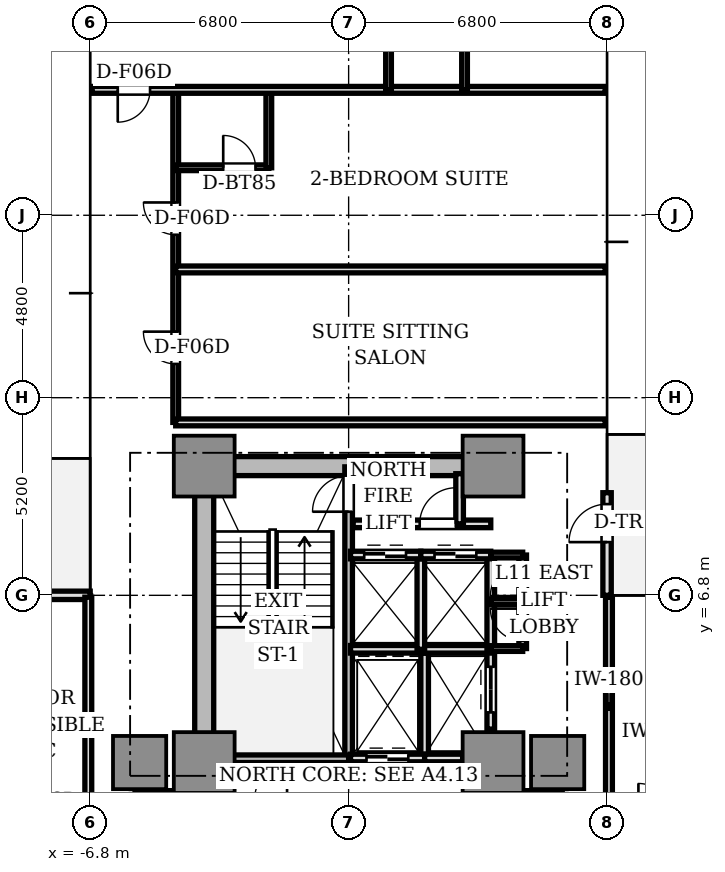
"""IFC4 building model, lengths in metres.
Left out: names, types, materials, properties, quantities, classifications, styles, units other than length and angle.
Written with IfcOpenShell. Run it as: python <this file> out.ifc"""

import sys

from ifc_helpers import new_model, si_unit, direction, frame, frame_2d, origin, origin_2d, place, context, subcontext, project, spatial, rectangle, extrude, source, transform, mapped, element, fill, save


model = new_model("IFC4")
c1 = context("Model", 3, precision=1e-05, world=origin(), true_north=direction((0.0, 1.0)))
c2 = subcontext(c1, "Body", "Model", "MODEL_VIEW")
j1 = project(units=[si_unit("LENGTHUNIT", "METRE"), si_unit("PLANEANGLEUNIT", "RADIAN")], contexts=[c1])
p1 = place(None, origin())
s1 = spatial("IfcSite", under=j1, at=p1, CompositionType="ELEMENT")
p2 = place(p1, origin())
s2 = spatial("IfcBuilding", under=s1, at=p2, CompositionType="ELEMENT")
p3 = place(p2, frame((0.0, 0.0, 43.2)))
s3 = spatial("IfcBuildingStorey", under=s2, at=p3, CompositionType="ELEMENT", Elevation=43.2)
p4 = place(p3, frame((-3.55, 10.2, 0.0), z_axis=(0.0, 0.0, 1.0), x_axis=(1.0, 0.0, 0.0)))
e1 = element("IfcWall", 1, at=p4, inside=s3, PredefinedType="SHEAR", context=c2, shape_type="SweptSolid", body=[
    extrude(rectangle(XDim=7.1, YDim=0.5, at=frame_2d((3.55, 0.0))), origin(), (0.0, 0.0, 1.0), 3.05),
])
p5 = place(p3, frame((-3.8, 2.85, 0.0), z_axis=(0.0, 0.0, 1.0), x_axis=(0.0, 1.0, 0.0)))
e2 = element("IfcWall", 2, at=p5, inside=s3, PredefinedType="SHEAR", context=c2, shape_type="SweptSolid", body=[
    extrude(rectangle(XDim=6.9, YDim=0.5, at=frame_2d((3.45, 0.0))), origin(), (0.0, 0.0, 1.0), 3.05),
])
m1 = source(origin(), c2, "Body", "SweptSolid", [
    extrude(rectangle(XDim=1.6, YDim=1.6, at=origin_2d()), origin(), (0.0, 0.0, 1.0), 3.05),
])
for number, where, z_axis, x_axis in (
    (3, (-3.8, 2.4, 0.0), (0.0, 0.0, 1.0), (1.0, 0.0, 0.0)),
    (4, (3.8, 2.4, 0.0), (0.0, 0.0, 1.0), (1.0, 0.0, 0.0)),
    (5, (-3.8, 10.2, 0.0), (0.0, 0.0, 1.0), (1.0, 0.0, 0.0)),
    (6, (3.8, 10.2, 0.0), (0.0, 0.0, 1.0), (1.0, 0.0, 0.0)),
):
    element("IfcColumn", number, at=place(p3, frame(where, z_axis=z_axis, x_axis=x_axis)), inside=s3, PredefinedType="COLUMN", context=c2, shape_type="MappedRepresentation", body=[
        mapped(m1, transform((0.0, 0.0, 0.0), scale=1.0)),
    ])
m2 = source(origin(), c2, "Body", "SweptSolid", [
    extrude(rectangle(XDim=1.4, YDim=1.4, at=origin_2d()), origin(), (0.0, 0.0, 1.0), 3.05),
])
for number, where, z_axis, x_axis in (
    (7, (5.5, 2.4, 0.0), (0.0, 0.0, 1.0), (1.0, 0.0, 0.0)),
    (8, (-5.5, 2.4, 0.0), (0.0, 0.0, 1.0), (1.0, 0.0, 0.0)),
):
    element("IfcColumn", number, at=place(p3, frame(where, z_axis=z_axis, x_axis=x_axis)), inside=s3, PredefinedType="COLUMN", context=c2, shape_type="MappedRepresentation", body=[
        mapped(m2, transform((0.0, 0.0, 0.0), scale=1.0)),
    ])
p6 = place(p3, frame((6.8, 6.8, 0.0), z_axis=(0.0, 0.0, 1.0), x_axis=(0.0, 1.0, 0.0)))
e9 = element("IfcWall", 9, at=p6, inside=s3, PredefinedType="STANDARD", context=c2, shape_type="SweptSolid", body=[
    extrude(rectangle(XDim=2.7, YDim=0.22, at=frame_2d((1.35, 0.0))), origin(), (0.0, 0.0, 1.0), 3.05),
])
p7 = place(p6, frame((1.4, 0.0, 0.0)))
e10 = element("IfcOpeningElement", 10, at=p7, cuts=e9, PredefinedType="OPENING", context=c2, shape_type="SweptSolid", body=[
    extrude(rectangle(XDim=1.0, YDim=2.2, at=frame_2d((0.5, 1.1))), frame((0.0, 0.12, 0.0), z_axis=(0.0, -1.0, 0.0), x_axis=(1.0, 0.0, 0.0)), (0.0, 0.0, 1.0), 0.24),
])
p8 = place(p3, frame((-6.8, 6.8, 0.0), z_axis=(0.0, 0.0, 1.0), x_axis=(-1.0, 0.0, 0.0)))
e11 = element("IfcWall", 11, at=p8, inside=s3, PredefinedType="STANDARD", context=c2, shape_type="SweptSolid", body=[
    extrude(rectangle(XDim=2.7, YDim=0.22, at=frame_2d((1.35, 0.0))), origin(), (0.0, 0.0, 1.0), 3.05),
])
p9 = place(p8, frame((1.4, 0.0, 0.0)))
e12 = element("IfcOpeningElement", 12, at=p9, cuts=e11, PredefinedType="OPENING", context=c2, shape_type="SweptSolid", body=[
    extrude(rectangle(XDim=1.0, YDim=2.2, at=frame_2d((0.5, 1.1))), frame((0.0, 0.12, 0.0), z_axis=(0.0, -1.0, 0.0), x_axis=(1.0, 0.0, 0.0)), (0.0, 0.0, 1.0), 0.24),
])
p10 = place(p3, frame((0.0, 2.5, 0.0), z_axis=(0.0, 0.0, 1.0), x_axis=(0.0, 1.0, 0.0)))
e13 = element("IfcWall", 13, at=p10, inside=s3, PredefinedType="SOLIDWALL", context=c2, shape_type="SweptSolid", body=[
    extrude(rectangle(XDim=7.68, YDim=0.2, at=frame_2d((3.84, 0.0))), origin(), (0.0, 0.0, 1.0), 3.05),
])
p11 = place(p10, frame((6.5, 0.0, 0.0)))
e14 = element("IfcOpeningElement", 14, at=p11, cuts=e13, PredefinedType="OPENING", context=c2, shape_type="SweptSolid", body=[
    extrude(rectangle(XDim=0.95, YDim=2.15, at=frame_2d((0.475, 1.075))), frame((0.0, 0.11, 0.0), z_axis=(0.0, -1.0, 0.0), x_axis=(1.0, 0.0, 0.0)), (0.0, 0.0, 1.0), 0.22),
])
p12 = place(p3, frame((-3.72, 2.5, 0.0), z_axis=(0.0, 0.0, 1.0), x_axis=(1.0, 0.0, 0.0)))
e15 = element("IfcWall", 15, at=p12, inside=s3, PredefinedType="SOLIDWALL", context=c2, shape_type="SweptSolid", body=[
    extrude(rectangle(XDim=3.72, YDim=0.2, at=frame_2d((1.86, 0.0))), origin(), (0.0, 0.0, 1.0), 3.05),
])
p13 = place(p3, frame((2.0, 2.5, 0.0), z_axis=(0.0, 0.0, 1.0), x_axis=(0.0, 1.0, 0.0)))
e16 = element("IfcWall", 16, at=p13, inside=s3, PredefinedType="SOLIDWALL", context=c2, shape_type="SweptSolid", body=[
    extrude(rectangle(XDim=2.78, YDim=0.2, at=frame_2d((1.39, 0.0))), origin(), (0.0, 0.0, 1.0), 2.6),
])
p14 = place(p3, frame((0.05, 2.52, 0.0), z_axis=(0.0, 0.0, 1.0), x_axis=(1.0, 0.0, 0.0)))
e17 = element("IfcWall", 17, at=p14, inside=s3, PredefinedType="SOLIDWALL", context=c2, shape_type="SweptSolid", body=[
    extrude(rectangle(XDim=1.95, YDim=0.2, at=frame_2d((0.975, 0.0))), origin(), (0.0, 0.0, 1.0), 2.6),
])
p15 = place(p14, frame((0.42, 0.0, 0.0)))
e18 = element("IfcOpeningElement", 18, at=p15, cuts=e17, PredefinedType="OPENING", context=c2, shape_type="SweptSolid", body=[
    extrude(rectangle(XDim=1.1, YDim=2.2, at=frame_2d((0.55, 1.1))), frame((0.0, 0.11, 0.0), z_axis=(0.0, -1.0, 0.0), x_axis=(1.0, 0.0, 0.0)), (0.0, 0.0, 1.0), 0.22),
])
p16 = place(p3, frame((2.0, 2.52, 0.0), z_axis=(0.0, 0.0, 1.0), x_axis=(1.0, 0.0, 0.0)))
e19 = element("IfcWall", 19, at=p16, inside=s3, PredefinedType="SOLIDWALL", context=c2, shape_type="SweptSolid", body=[
    extrude(rectangle(XDim=1.0, YDim=0.2, at=frame_2d((0.5, 0.0))), origin(), (0.0, 0.0, 1.0), 2.6),
])
p17 = place(p3, frame((3.74, 3.28, 0.0), z_axis=(0.0, 0.0, 1.0), x_axis=(0.0, 1.0, 0.0)))
e20 = element("IfcWall", 20, at=p17, inside=s3, PredefinedType="SOLIDWALL", context=c2, shape_type="SweptSolid", body=[
    extrude(rectangle(XDim=2.08, YDim=0.2, at=frame_2d((1.04, 0.0))), origin(), (0.0, 0.0, 1.0), 2.6),
])
p18 = place(p17, frame((0.44, 0.0, 0.0)))
e21 = element("IfcOpeningElement", 21, at=p18, cuts=e20, PredefinedType="OPENING", context=c2, shape_type="SweptSolid", body=[
    extrude(rectangle(XDim=1.2, YDim=2.2, at=frame_2d((0.6, 1.1))), frame((0.0, 0.11, 0.0), z_axis=(0.0, -1.0, 0.0), x_axis=(1.0, 0.0, 0.0)), (0.0, 0.0, 1.0), 0.22),
])
p19 = place(p3, frame((0.05, 5.38, 0.0), z_axis=(0.0, 0.0, 1.0), x_axis=(1.0, 0.0, 0.0)))
e22 = element("IfcWall", 22, at=p19, inside=s3, PredefinedType="SOLIDWALL", context=c2, shape_type="SweptSolid", body=[
    extrude(rectangle(XDim=3.69, YDim=0.2, at=frame_2d((1.845, 0.0))), origin(), (0.0, 0.0, 1.0), 2.6),
])
p20 = place(p3, frame((1.9, 5.38, 0.0), z_axis=(0.0, 0.0, 1.0), x_axis=(0.0, 1.0, 0.0)))
e23 = element("IfcWall", 23, at=p20, inside=s3, PredefinedType="SOLIDWALL", context=c2, shape_type="SweptSolid", body=[
    extrude(rectangle(XDim=2.48, YDim=0.2, at=frame_2d((1.24, 0.0))), origin(), (0.0, 0.0, 1.0), 2.6),
])
p21 = place(p3, frame((0.05, 7.86, 0.0), z_axis=(0.0, 0.0, 1.0), x_axis=(1.0, 0.0, 0.0)))
e24 = element("IfcWall", 24, at=p21, inside=s3, PredefinedType="SOLIDWALL", context=c2, shape_type="SweptSolid", body=[
    extrude(rectangle(XDim=1.85, YDim=0.2, at=frame_2d((0.925, 0.0))), origin(), (0.0, 0.0, 1.0), 2.6),
])
p22 = place(p21, frame((0.36, 0.0, 0.0)))
e25 = element("IfcOpeningElement", 25, at=p22, cuts=e24, PredefinedType="OPENING", context=c2, shape_type="SweptSolid", body=[
    extrude(rectangle(XDim=1.1, YDim=2.2, at=frame_2d((0.55, 1.1))), frame((0.0, 0.11, 0.0), z_axis=(0.0, -1.0, 0.0), x_axis=(1.0, 0.0, 0.0)), (0.0, 0.0, 1.0), 0.22),
])
p23 = place(p3, frame((3.74, 5.38, 0.0), z_axis=(0.0, 0.0, 1.0), x_axis=(0.0, 1.0, 0.0)))
e26 = element("IfcWall", 26, at=p23, inside=s3, PredefinedType="SOLIDWALL", context=c2, shape_type="SweptSolid", body=[
    extrude(rectangle(XDim=2.48, YDim=0.2, at=frame_2d((1.24, 0.0))), origin(), (0.0, 0.0, 1.0), 2.6),
])
p24 = place(p3, frame((1.9, 7.86, 0.0), z_axis=(0.0, 0.0, 1.0), x_axis=(1.0, 0.0, 0.0)))
e27 = element("IfcWall", 27, at=p24, inside=s3, PredefinedType="SOLIDWALL", context=c2, shape_type="SweptSolid", body=[
    extrude(rectangle(XDim=1.84, YDim=0.2, at=frame_2d((0.92, 0.0))), origin(), (0.0, 0.0, 1.0), 2.6),
])
p25 = place(p24, frame((0.36, 0.0, 0.0)))
e28 = element("IfcOpeningElement", 28, at=p25, cuts=e27, PredefinedType="OPENING", context=c2, shape_type="SweptSolid", body=[
    extrude(rectangle(XDim=1.1, YDim=2.2, at=frame_2d((0.55, 1.1))), frame((0.0, 0.11, 0.0), z_axis=(0.0, -1.0, 0.0), x_axis=(1.0, 0.0, 0.0)), (0.0, 0.0, 1.0), 0.22),
])
for number, where, z_axis, x_axis in (
    (29, (3.98, 1.56, 0.0), (0.0, 0.0, 1.0), (1.0, 0.0, 0.0)),
    (30, (-5.62, 1.56, 0.0), (0.0, 0.0, 1.0), (1.0, 0.0, 0.0)),
):
    element("IfcWall", number, at=place(p3, frame(where, z_axis=z_axis, x_axis=x_axis)), inside=s3, PredefinedType="SOLIDWALL", context=c2, shape_type="SweptSolid", body=[
        extrude(rectangle(XDim=1.64, YDim=0.2, at=frame_2d((0.82, 0.0))), origin(), (0.0, 0.0, 1.0), 2.6),
    ])
p26 = place(p3, frame((0.12, 8.68, 0.0), z_axis=(0.0, 0.0, 1.0), x_axis=(1.0, 0.0, 0.0)))
e31 = element("IfcWall", 31, at=p26, inside=s3, PredefinedType="SOLIDWALL", context=c2, shape_type="SweptSolid", body=[
    extrude(rectangle(XDim=3.62, YDim=0.2, at=frame_2d((1.81, 0.0))), origin(), (0.0, 0.0, 1.0), 2.6),
])
p27 = place(p26, frame((1.75, 0.0, 0.0)))
e32 = element("IfcOpeningElement", 32, at=p27, cuts=e31, PredefinedType="OPENING", context=c2, shape_type="SweptSolid", body=[
    extrude(rectangle(XDim=0.95, YDim=2.15, at=frame_2d((0.475, 1.075))), frame((0.0, 0.11, 0.0), z_axis=(0.0, -1.0, 0.0), x_axis=(1.0, 0.0, 0.0)), (0.0, 0.0, 1.0), 0.22),
])
p28 = place(p3, frame((2.92, 8.68, 0.0), z_axis=(0.0, 0.0, 1.0), x_axis=(0.0, 1.0, 0.0)))
e33 = element("IfcWall", 33, at=p28, inside=s3, PredefinedType="SOLIDWALL", context=c2, shape_type="SweptSolid", body=[
    extrude(rectangle(XDim=1.32, YDim=0.2, at=frame_2d((0.66, 0.0))), origin(), (0.0, 0.0, 1.0), 2.6),
])
p29 = place(p3, frame((4.58, 5.4, 0.0), z_axis=(0.0, 0.0, 1.0), x_axis=(0.0, 1.0, 0.0)))
e34 = element("IfcWall", 34, at=p29, inside=s3, PredefinedType="SOLIDWALL", context=c2, shape_type="SweptSolid", body=[
    extrude(rectangle(XDim=2.46, YDim=0.2, at=frame_2d((1.23, 0.0))), origin(), (0.0, 0.0, 1.0), 2.6),
])
p30 = place(p29, frame((0.2, 0.0, 0.0)))
e35 = element("IfcOpeningElement", 35, at=p30, cuts=e34, PredefinedType="OPENING", context=c2, shape_type="SweptSolid", body=[
    extrude(rectangle(XDim=0.85, YDim=2.1, at=frame_2d((0.425, 1.05))), frame((0.0, 0.11, 0.0), z_axis=(0.0, -1.0, 0.0), x_axis=(1.0, 0.0, 0.0)), (0.0, 0.0, 1.0), 0.22),
])
p31 = place(p29, frame((1.38, 0.0, 0.0)))
e36 = element("IfcOpeningElement", 36, at=p31, cuts=e34, PredefinedType="OPENING", context=c2, shape_type="SweptSolid", body=[
    extrude(rectangle(XDim=0.85, YDim=2.1, at=frame_2d((0.425, 1.05))), frame((0.0, 0.11, 0.0), z_axis=(0.0, -1.0, 0.0), x_axis=(1.0, 0.0, 0.0)), (0.0, 0.0, 1.0), 0.22),
])
for number, where, z_axis, x_axis in (
    (37, (3.74, 5.4, 0.0), (0.0, 0.0, 1.0), (1.0, 0.0, 0.0)),
    (38, (3.74, 7.86, 0.0), (0.0, 0.0, 1.0), (1.0, 0.0, 0.0)),
    (39, (3.74, 6.63, 0.0), (0.0, 0.0, 1.0), (1.0, 0.0, 0.0)),
):
    element("IfcWall", number, at=place(p3, frame(where, z_axis=z_axis, x_axis=x_axis)), inside=s3, PredefinedType="PARTITIONING", context=c2, shape_type="SweptSolid", body=[
        extrude(rectangle(XDim=0.84, YDim=0.15, at=frame_2d((0.42, 0.0))), origin(), (0.0, 0.0, 1.0), 2.6),
    ])
p32 = place(p3, frame((6.85, 1.0, 0.0), z_axis=(0.0, 0.0, 1.0), x_axis=(0.0, 1.0, 0.0)))
e40 = element("IfcWall", 40, at=p32, inside=s3, PredefinedType="PARTITIONING", context=c2, shape_type="SweptSolid", body=[
    extrude(rectangle(XDim=5.75, YDim=0.18, at=frame_2d((2.875, 0.0))), origin(), (0.0, 0.0, 1.0), 2.6),
])
p33 = place(p3, frame((-4.55, 11.35, 0.0), z_axis=(0.0, 0.0, 1.0), x_axis=(0.0, 1.0, 0.0)))
e41 = element("IfcWall", 41, at=p33, inside=s3, PredefinedType="PARTITIONING", context=c2, shape_type="SweptSolid", body=[
    extrude(rectangle(XDim=8.75, YDim=0.15, at=frame_2d((4.375, 0.0))), origin(), (0.0, 0.0, 1.0), 2.57),
])
p34 = place(p33, frame((1.538, 0.0, 0.0)))
e42 = element("IfcOpeningElement", 42, at=p34, cuts=e41, PredefinedType="OPENING", context=c2, shape_type="SweptSolid", body=[
    extrude(rectangle(XDim=0.85, YDim=2.1, at=frame_2d((0.425, 1.05))), frame((0.0, 0.085, 0.0), z_axis=(0.0, -1.0, 0.0), x_axis=(1.0, 0.0, 0.0)), (0.0, 0.0, 1.0), 0.17),
])
p35 = place(p33, frame((4.937, 0.0, 0.0)))
e43 = element("IfcOpeningElement", 43, at=p35, cuts=e41, PredefinedType="OPENING", context=c2, shape_type="SweptSolid", body=[
    extrude(rectangle(XDim=0.85, YDim=2.1, at=frame_2d((0.425, 1.05))), frame((0.0, 0.085, 0.0), z_axis=(0.0, -1.0, 0.0), x_axis=(1.0, 0.0, 0.0)), (0.0, 0.0, 1.0), 0.17),
])
for number, where, z_axis, x_axis in (
    (44, (6.75, 11.35, 0.0), (0.0, 0.0, 1.0), (-1.0, 0.0, 0.0)),
    (45, (-4.55, 15.375, 0.0), (0.0, 0.0, 1.0), (1.0, 0.0, 0.0)),
):
    element("IfcWall", number, at=place(p3, frame(where, z_axis=z_axis, x_axis=x_axis)), inside=s3, PredefinedType="PARTITIONING", context=c2, shape_type="SweptSolid", body=[
        extrude(rectangle(XDim=11.3, YDim=0.18, at=frame_2d((5.65, 0.0))), origin(), (0.0, 0.0, 1.0), 2.6),
    ])
p36 = place(p3, frame((-4.55, 18.05, 0.0), z_axis=(0.0, 0.0, 1.0), x_axis=(1.0, 0.0, 0.0)))
e46 = element("IfcWall", 46, at=p36, inside=s3, PredefinedType="PARTITIONING", context=c2, shape_type="SweptSolid", body=[
    extrude(rectangle(XDim=2.45, YDim=0.15, at=frame_2d((1.225, 0.0))), origin(), (0.0, 0.0, 1.0), 2.6),
])
p37 = place(p36, frame((1.25, 0.0, 0.0)))
e47 = element("IfcOpeningElement", 47, at=p37, cuts=e46, PredefinedType="OPENING", context=c2, shape_type="SweptSolid", body=[
    extrude(rectangle(XDim=0.85, YDim=2.1, at=frame_2d((0.425, 1.05))), frame((0.0, 0.085, 0.0), z_axis=(0.0, -1.0, 0.0), x_axis=(1.0, 0.0, 0.0)), (0.0, 0.0, 1.0), 0.17),
])
p38 = place(p3, frame((-2.1, 18.05, 0.0), z_axis=(0.0, 0.0, 1.0), x_axis=(0.0, 1.0, 0.0)))
e48 = element("IfcWall", 48, at=p38, inside=s3, PredefinedType="PARTITIONING", context=c2, shape_type="SweptSolid", body=[
    extrude(rectangle(XDim=2.05, YDim=0.15, at=frame_2d((1.025, 0.0))), origin(), (0.0, 0.0, 1.0), 2.6),
])
p39 = place(p3, frame((6.75, 20.1, 0.0), z_axis=(0.0, 0.0, 1.0), x_axis=(-1.0, 0.0, 0.0)))
e49 = element("IfcWall", 49, at=p39, inside=s3, PredefinedType="PARTITIONING", context=c2, shape_type="SweptSolid", body=[
    extrude(rectangle(XDim=13.5, YDim=0.18, at=frame_2d((6.75, 0.0))), origin(), (0.0, 0.0, 1.0), 2.6),
])
p40 = place(p39, frame((11.975, 0.0, 0.0)))
e50 = element("IfcOpeningElement", 50, at=p40, cuts=e49, PredefinedType="OPENING", context=c2, shape_type="SweptSolid", body=[
    extrude(rectangle(XDim=0.85, YDim=2.1, at=frame_2d((0.425, 1.05))), frame((0.0, 0.1, 0.0), z_axis=(0.0, -1.0, 0.0), x_axis=(1.0, 0.0, 0.0)), (0.0, 0.0, 1.0), 0.2),
])
for number, where, z_axis, x_axis in (
    (51, (1.05, 20.1, 0.0), (0.0, 0.0, 1.0), (0.0, 1.0, 0.0)),
    (52, (3.05, 20.1, 0.0), (0.0, 0.0, 1.0), (0.0, 1.0, 0.0)),
):
    element("IfcWall", number, at=place(p3, frame(where, z_axis=z_axis, x_axis=x_axis)), inside=s3, PredefinedType="PARTITIONING", context=c2, shape_type="SweptSolid", body=[
        extrude(rectangle(XDim=2.05, YDim=0.15, at=frame_2d((1.025, 0.0))), origin(), (0.0, 0.0, 1.0), 2.6),
    ])
p41 = place(p3, frame((-6.85, 6.75, 0.0), z_axis=(0.0, 0.0, 1.0), x_axis=(0.0, -1.0, 0.0)))
e53 = element("IfcWall", 53, at=p41, inside=s3, PredefinedType="PARTITIONING", context=c2, shape_type="SweptSolid", body=[
    extrude(rectangle(XDim=5.8, YDim=0.18, at=frame_2d((2.9, 0.0))), origin(), (0.0, 0.0, 1.0), 2.6),
])
m3 = source(origin(), c2, "Body", "SweptSolid", [
    extrude(rectangle(XDim=1.0, YDim=0.05, at=origin_2d()), origin(), (0.0, 0.0, 1.0), 2.2),
])
p42 = place(p7, frame((0.5, 0.0, 0.0)))
e54 = element("IfcDoor", 54, at=p42, inside=s3, OperationType="SINGLE_SWING_LEFT", PredefinedType="DOOR", context=c2, shape_type="MappedRepresentation", body=[
    mapped(m3, transform((0.0, 0.0, 0.0), scale=1.0)),
])
fill(e10, e54)
m4 = source(origin(), c2, "Body", "SweptSolid", [
    extrude(rectangle(XDim=1.1, YDim=0.05, at=origin_2d()), origin(), (0.0, 0.0, 1.0), 2.2),
])
p43 = place(p15, frame((0.55, 0.0, 0.0)))
e55 = element("IfcDoor", 55, at=p43, inside=s3, OperationType="DOUBLE_DOOR_SLIDING", PredefinedType="DOOR", context=c2, shape_type="MappedRepresentation", body=[
    mapped(m4, transform((0.0, 0.0, 0.0), scale=1.0)),
])
fill(e18, e55)
m5 = source(origin(), c2, "Body", "SweptSolid", [
    extrude(rectangle(XDim=1.2, YDim=0.05, at=origin_2d()), origin(), (0.0, 0.0, 1.0), 2.2),
])
p44 = place(p18, frame((0.6, 0.0, 0.0)))
e56 = element("IfcDoor", 56, at=p44, inside=s3, OperationType="DOUBLE_DOOR_SLIDING", PredefinedType="DOOR", context=c2, shape_type="MappedRepresentation", body=[
    mapped(m5, transform((0.0, 0.0, 0.0), scale=1.0)),
])
fill(e21, e56)
p45 = place(p22, frame((0.55, 0.0, 0.0)))
e57 = element("IfcDoor", 57, at=p45, inside=s3, OperationType="DOUBLE_DOOR_SLIDING", PredefinedType="DOOR", context=c2, shape_type="MappedRepresentation", body=[
    mapped(m4, transform((0.0, 0.0, 0.0), scale=1.0)),
])
fill(e25, e57)
p46 = place(p25, frame((0.55, 0.0, 0.0)))
e58 = element("IfcDoor", 58, at=p46, inside=s3, OperationType="DOUBLE_DOOR_SLIDING", PredefinedType="DOOR", context=c2, shape_type="MappedRepresentation", body=[
    mapped(m4, transform((0.0, 0.0, 0.0), scale=1.0)),
])
fill(e28, e58)
m6 = source(origin(), c2, "Body", "SweptSolid", [
    extrude(rectangle(XDim=0.95, YDim=0.05, at=origin_2d()), origin(), (0.0, 0.0, 1.0), 2.15),
])
p47 = place(p11, frame((0.475, 0.0, 0.0)))
e59 = element("IfcDoor", 59, at=p47, inside=s3, OperationType="SINGLE_SWING_LEFT", PredefinedType="DOOR", context=c2, shape_type="MappedRepresentation", body=[
    mapped(m6, transform((0.0, 0.0, 0.0), scale=1.0)),
])
fill(e14, e59)
p48 = place(p27, frame((0.475, 0.0, 0.0)))
e60 = element("IfcDoor", 60, at=p48, inside=s3, OperationType="SINGLE_SWING_RIGHT", PredefinedType="DOOR", context=c2, shape_type="MappedRepresentation", body=[
    mapped(m6, transform((0.0, 0.0, 0.0), scale=1.0)),
])
fill(e32, e60)
m7 = source(origin(), c2, "Body", "SweptSolid", [
    extrude(rectangle(XDim=0.85, YDim=0.05, at=origin_2d()), origin(), (0.0, 0.0, 1.0), 2.1),
])
p49 = place(p30, frame((0.425, 0.0, 0.0)))
e61 = element("IfcDoor", 61, at=p49, inside=s3, OperationType="SINGLE_SWING_RIGHT", PredefinedType="DOOR", context=c2, shape_type="MappedRepresentation", body=[
    mapped(m7, transform((0.0, 0.0, 0.0), scale=1.0)),
])
fill(e35, e61)
p50 = place(p31, frame((0.425, 0.0, 0.0)))
e62 = element("IfcDoor", 62, at=p50, inside=s3, OperationType="SINGLE_SWING_LEFT", PredefinedType="DOOR", context=c2, shape_type="MappedRepresentation", body=[
    mapped(m7, transform((0.0, 0.0, 0.0), scale=1.0)),
])
fill(e36, e62)
p51 = place(p34, frame((0.425, 0.0, 0.0)))
e63 = element("IfcDoor", 63, at=p51, inside=s3, OperationType="SINGLE_SWING_RIGHT", PredefinedType="DOOR", context=c2, shape_type="MappedRepresentation", body=[
    mapped(m7, transform((0.0, 0.0, 0.0), scale=1.0)),
])
fill(e42, e63)
p52 = place(p37, frame((0.425, 0.0, 0.0)))
e64 = element("IfcDoor", 64, at=p52, inside=s3, OperationType="SINGLE_SWING_LEFT", PredefinedType="DOOR", context=c2, shape_type="MappedRepresentation", body=[
    mapped(m7, transform((0.0, 0.0, 0.0), scale=1.0)),
])
fill(e47, e64)
p53 = place(p35, frame((0.425, 0.0, 0.0)))
e65 = element("IfcDoor", 65, at=p53, inside=s3, OperationType="SINGLE_SWING_RIGHT", PredefinedType="DOOR", context=c2, shape_type="MappedRepresentation", body=[
    mapped(m7, transform((0.0, 0.0, 0.0), scale=1.0)),
])
fill(e43, e65)
p54 = place(p40, frame((0.425, 0.0, 0.0)))
e66 = element("IfcDoor", 66, at=p54, inside=s3, OperationType="SINGLE_SWING_RIGHT", PredefinedType="DOOR", context=c2, shape_type="MappedRepresentation", body=[
    mapped(m7, transform((0.0, 0.0, 0.0), scale=1.0)),
])
fill(e50, e66)
save(model, sys.argv[1])
